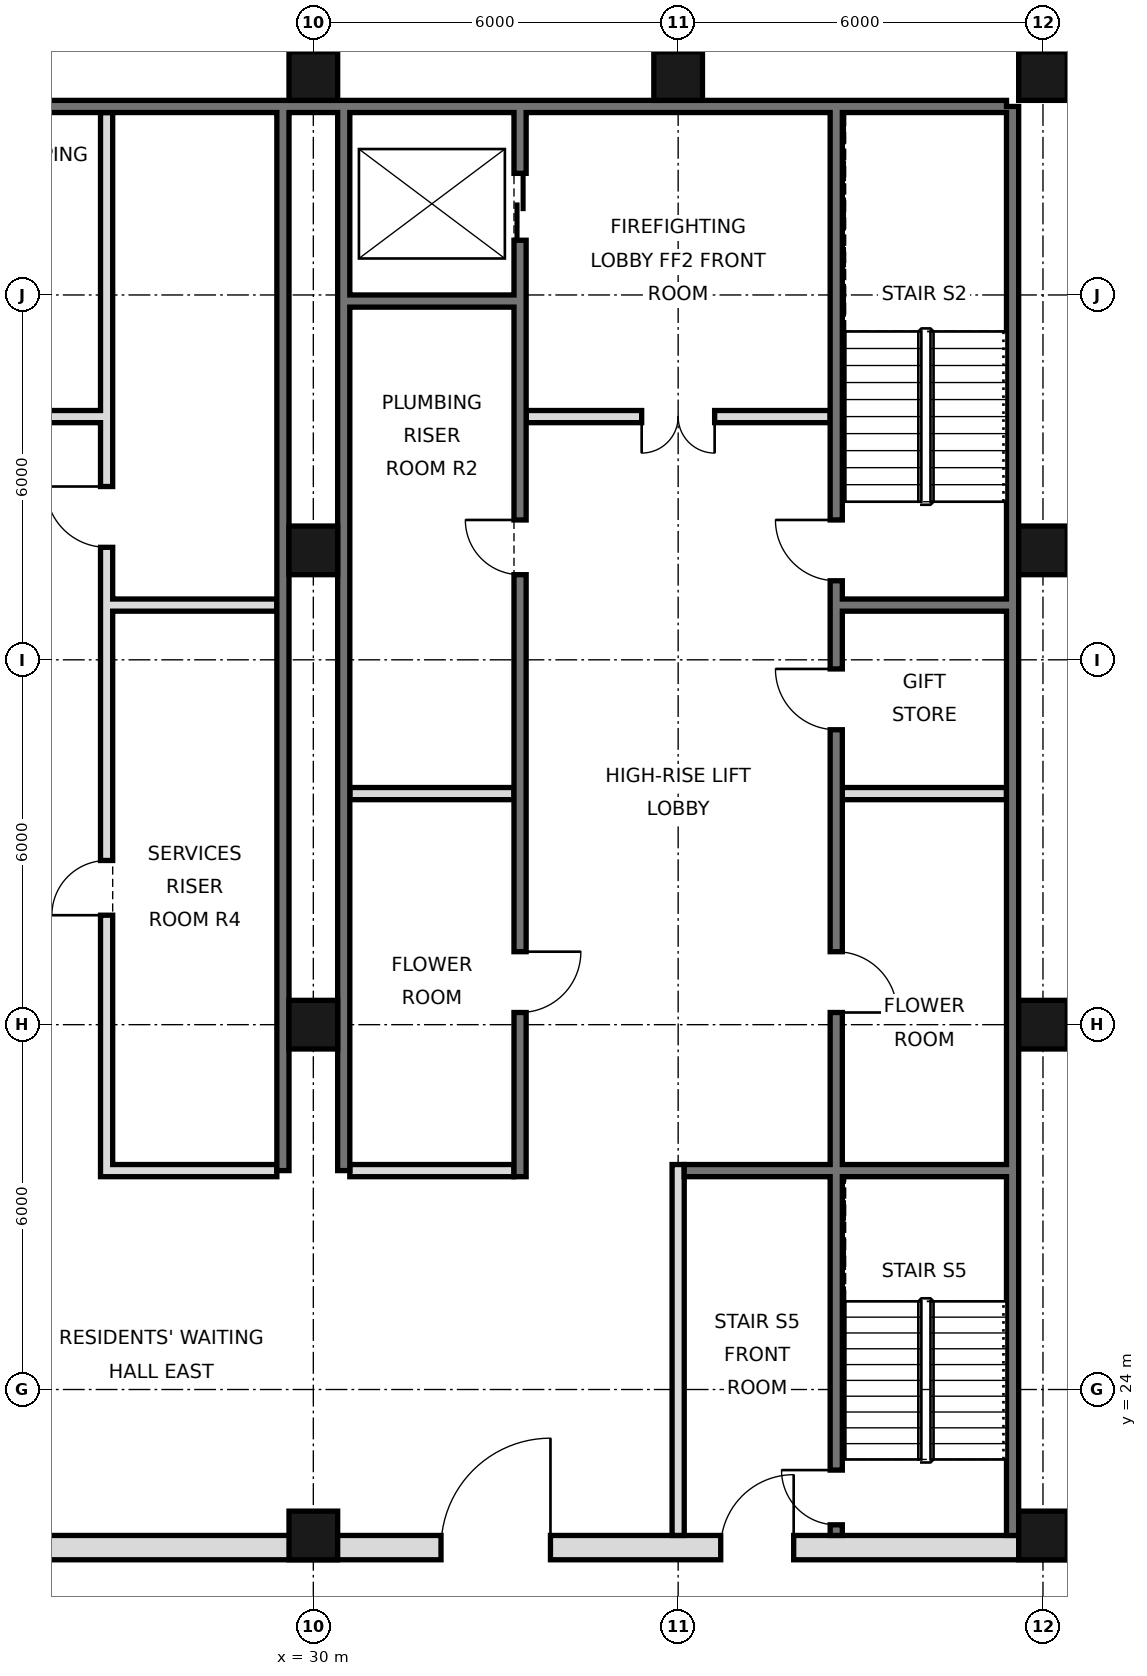
"""IFC4 building model, lengths in metres.
Left out: names, types, materials, properties, quantities, classifications, styles, units other than length and angle.
Written with IfcOpenShell. Run it as: python <this file> out.ifc"""

import sys

from ifc_helpers import new_model, si_unit, direction, frame, frame_2d, origin, origin_2d, place, context, subcontext, project, spatial, rectangle, hollow_rectangle, extrude, element, fill, save


model = new_model("IFC4")
c1 = context("Model", 3, precision=1e-05, world=origin(), true_north=direction((0.0, 1.0)))
c2 = subcontext(c1, "Body", "Model", "MODEL_VIEW")
j1 = project(units=[si_unit("LENGTHUNIT", "METRE"), si_unit("PLANEANGLEUNIT", "RADIAN")], contexts=[c1])
p1 = place(None, origin())
s1 = spatial("IfcSite", under=j1, at=p1, CompositionType="ELEMENT")
p2 = place(p1, origin())
s2 = spatial("IfcBuilding", under=s1, at=p2, CompositionType="ELEMENT")
p3 = place(p2, frame((0.0, 0.0, 71.4)))
s3 = spatial("IfcBuildingStorey", under=s2, at=p3, CompositionType="ELEMENT", Elevation=71.4)
for number, where, z_axis, x_axis in (
    (1, (30.0, 21.6, 0.0), (0.0, 0.0, 1.0), (1.0, 0.0, 0.0)),
    (2, (30.0, 30.0, 0.0), (0.0, 0.0, 1.0), (1.0, 0.0, 0.0)),
    (3, (30.0, 37.8, 0.0), (0.0, 0.0, 1.0), (1.0, 0.0, 0.0)),
    (4, (30.0, 45.6, 0.0), (0.0, 0.0, 1.0), (1.0, 0.0, 0.0)),
    (5, (36.0, 45.6, 0.0), (0.0, 0.0, 1.0), (1.0, 0.0, 0.0)),
    (6, (42.0, 21.6, 0.0), (0.0, 0.0, 1.0), (1.0, 0.0, 0.0)),
    (7, (42.0, 30.0, 0.0), (0.0, 0.0, 1.0), (1.0, 0.0, 0.0)),
    (8, (42.0, 37.8, 0.0), (0.0, 0.0, 1.0), (1.0, 0.0, 0.0)),
    (9, (42.0, 45.6, 0.0), (0.0, 0.0, 1.0), (1.0, 0.0, 0.0)),
):
    element("IfcColumn", number, at=place(p3, frame(where, z_axis=z_axis, x_axis=x_axis)), inside=s3, PredefinedType="COLUMN", context=c2, shape_type="SweptSolid", body=[
        extrude(hollow_rectangle(XDim=0.8, YDim=0.8, WallThickness=0.06, at=origin_2d()), origin(), (0.0, 0.0, 1.0), 3.6),
    ])
p4 = place(p3, frame((41.5, 21.6, 0.0), z_axis=(0.0, 0.0, 1.0), x_axis=(0.0, 1.0, 0.0)))
e10 = element("IfcWall", 10, at=p4, inside=s3, PredefinedType="SOLIDWALL", context=c2, shape_type="SweptSolid", body=[
    extrude(rectangle(XDim=23.5, YDim=0.2, at=frame_2d((11.75, 0.0))), origin(), (0.0, 0.0, 1.0), 3.42),
])
p5 = place(p3, frame((6.6, 45.1, 0.0), z_axis=(0.0, 0.0, 1.0), x_axis=(1.0, 0.0, 0.0)))
e11 = element("IfcWall", 11, at=p5, inside=s3, PredefinedType="SOLIDWALL", context=c2, shape_type="SweptSolid", body=[
    extrude(rectangle(XDim=34.8, YDim=0.2, at=frame_2d((17.4, 0.0))), origin(), (0.0, 0.0, 1.0), 3.42),
])
for number, where, z_axis, x_axis in (
    (12, (29.5, 27.6, 0.0), (0.0, 0.0, 1.0), (0.0, 1.0, 0.0)),
    (13, (30.5, 27.6, 0.0), (0.0, 0.0, 1.0), (0.0, 1.0, 0.0)),
):
    element("IfcWall", number, at=place(p3, frame(where, z_axis=z_axis, x_axis=x_axis)), inside=s3, PredefinedType="SOLIDWALL", context=c2, shape_type="SweptSolid", body=[
        extrude(rectangle(XDim=17.5, YDim=0.2, at=frame_2d((8.75, 0.0))), origin(), (0.0, 0.0, 1.0), 3.42),
    ])
p6 = place(p3, frame((5.6, 21.4, 0.0), z_axis=(0.0, 0.0, 1.0), x_axis=(1.0, 0.0, 0.0)))
e14 = element("IfcWall", 14, at=p6, inside=s3, PredefinedType="SOLIDWALL", context=c2, shape_type="SweptSolid", body=[
    extrude(rectangle(XDim=36.8, YDim=0.4, at=frame_2d((18.4, 0.0))), origin(), (0.0, 0.0, 1.0), 3.42),
])
p7 = place(p6, frame((8.5, 0.0, 0.0)))
e15 = element("IfcOpeningElement", 15, at=p7, cuts=e14, PredefinedType="OPENING", context=c2, shape_type="SweptSolid", body=[
    extrude(rectangle(XDim=1.8, YDim=2.1, at=frame_2d((0.9, 1.05))), frame((0.0, 0.21, 0.0), z_axis=(0.0, -1.0, 0.0), x_axis=(1.0, 0.0, 0.0)), (0.0, 0.0, 1.0), 0.42),
])
p8 = place(p6, frame((17.5, 0.0, 0.0)))
e16 = element("IfcOpeningElement", 16, at=p8, cuts=e14, PredefinedType="OPENING", context=c2, shape_type="SweptSolid", body=[
    extrude(rectangle(XDim=1.8, YDim=2.1, at=frame_2d((0.9, 1.05))), frame((0.0, 0.21, 0.0), z_axis=(0.0, -1.0, 0.0), x_axis=(1.0, 0.0, 0.0)), (0.0, 0.0, 1.0), 0.42),
])
p9 = place(p6, frame((26.5, 0.0, 0.0)))
e17 = element("IfcOpeningElement", 17, at=p9, cuts=e14, PredefinedType="OPENING", context=c2, shape_type="SweptSolid", body=[
    extrude(rectangle(XDim=1.8, YDim=2.1, at=frame_2d((0.9, 1.05))), frame((0.0, 0.21, 0.0), z_axis=(0.0, -1.0, 0.0), x_axis=(1.0, 0.0, 0.0)), (0.0, 0.0, 1.0), 0.42),
])
p10 = place(p6, frame((4.5, 0.0, 0.0)))
e18 = element("IfcOpeningElement", 18, at=p10, cuts=e14, PredefinedType="OPENING", context=c2, shape_type="SweptSolid", body=[
    extrude(rectangle(XDim=1.2, YDim=2.1, at=frame_2d((0.6, 1.05))), frame((0.0, 0.21, 0.0), z_axis=(0.0, -1.0, 0.0), x_axis=(1.0, 0.0, 0.0)), (0.0, 0.0, 1.0), 0.42),
])
p11 = place(p6, frame((31.1, 0.0, 0.0)))
e19 = element("IfcOpeningElement", 19, at=p11, cuts=e14, PredefinedType="OPENING", context=c2, shape_type="SweptSolid", body=[
    extrude(rectangle(XDim=1.2, YDim=2.1, at=frame_2d((0.6, 1.05))), frame((0.0, 0.21, 0.0), z_axis=(0.0, -1.0, 0.0), x_axis=(1.0, 0.0, 0.0)), (0.0, 0.0, 1.0), 0.42),
])
p12 = place(p3, frame((26.6, 27.5, 0.0), z_axis=(0.0, 0.0, 1.0), x_axis=(0.0, 1.0, 0.0)))
e20 = element("IfcWall", 20, at=p12, inside=s3, PredefinedType="SOLIDWALL", context=c2, shape_type="SweptSolid", body=[
    extrude(rectangle(XDim=17.5, YDim=0.2, at=frame_2d((8.75, 0.0))), origin(), (0.0, 0.0, 1.0), 3.42),
])
p13 = place(p12, frame((4.3, 0.0, 0.0)))
e21 = element("IfcOpeningElement", 21, at=p13, cuts=e20, PredefinedType="OPENING", context=c2, shape_type="SweptSolid", body=[
    extrude(rectangle(XDim=0.9, YDim=2.1, at=frame_2d((0.45, 1.05))), frame((0.0, 0.11, 0.0), z_axis=(0.0, -1.0, 0.0), x_axis=(1.0, 0.0, 0.0)), (0.0, 0.0, 1.0), 0.22),
])
p14 = place(p12, frame((10.35, 0.0, 0.0)))
e22 = element("IfcOpeningElement", 22, at=p14, cuts=e20, PredefinedType="OPENING", context=c2, shape_type="SweptSolid", body=[
    extrude(rectangle(XDim=1.0, YDim=2.1, at=frame_2d((0.5, 1.05))), frame((0.0, 0.11, 0.0), z_axis=(0.0, -1.0, 0.0), x_axis=(1.0, 0.0, 0.0)), (0.0, 0.0, 1.0), 0.22),
])
p15 = place(p3, frame((33.4, 27.5, 0.0), z_axis=(0.0, 0.0, 1.0), x_axis=(0.0, 1.0, 0.0)))
e23 = element("IfcWall", 23, at=p15, inside=s3, PredefinedType="SOLIDWALL", context=c2, shape_type="SweptSolid", body=[
    extrude(rectangle(XDim=17.5, YDim=0.2, at=frame_2d((8.75, 0.0))), origin(), (0.0, 0.0, 1.0), 3.42),
])
p16 = place(p15, frame((15.4, 0.0, 0.0)))
e24 = element("IfcOpeningElement", 24, at=p16, cuts=e23, PredefinedType="OPENING", context=c2, shape_type="SweptSolid", body=[
    extrude(rectangle(XDim=1.1, YDim=2.1, at=frame_2d((0.55, 1.05))), frame((0.0, 0.11, 0.0), z_axis=(0.0, -1.0, 0.0), x_axis=(1.0, 0.0, 0.0)), (0.0, 0.0, 1.0), 0.22),
])
p17 = place(p15, frame((2.7, 0.0, 0.0)))
e25 = element("IfcOpeningElement", 25, at=p17, cuts=e23, PredefinedType="OPENING", context=c2, shape_type="SweptSolid", body=[
    extrude(rectangle(XDim=1.0, YDim=2.1, at=frame_2d((0.5, 1.05))), frame((0.0, 0.11, 0.0), z_axis=(0.0, -1.0, 0.0), x_axis=(1.0, 0.0, 0.0)), (0.0, 0.0, 1.0), 0.22),
])
p18 = place(p15, frame((9.9, 0.0, 0.0)))
e26 = element("IfcOpeningElement", 26, at=p18, cuts=e23, PredefinedType="OPENING", context=c2, shape_type="SweptSolid", body=[
    extrude(rectangle(XDim=0.9, YDim=2.1, at=frame_2d((0.45, 1.05))), frame((0.0, 0.11, 0.0), z_axis=(0.0, -1.0, 0.0), x_axis=(1.0, 0.0, 0.0)), (0.0, 0.0, 1.0), 0.22),
])
p19 = place(p3, frame((36.0, 21.6, 0.0), z_axis=(0.0, 0.0, 1.0), x_axis=(0.0, 1.0, 0.0)))
e27 = element("IfcWall", 27, at=p19, inside=s3, PredefinedType="PARTITIONING", context=c2, shape_type="SweptSolid", body=[
    extrude(rectangle(XDim=6.1, YDim=0.2, at=frame_2d((3.05, 0.0))), origin(), (0.0, 0.0, 1.0), 3.42),
])
p20 = place(p3, frame((38.6, 21.6, 0.0), z_axis=(0.0, 0.0, 1.0), x_axis=(0.0, 1.0, 0.0)))
e28 = element("IfcWall", 28, at=p20, inside=s3, PredefinedType="SOLIDWALL", context=c2, shape_type="SweptSolid", body=[
    extrude(rectangle(XDim=23.4, YDim=0.2, at=frame_2d((11.7, 0.0))), origin(), (0.0, 0.0, 1.0), 3.42),
])
p21 = place(p20, frame((8.6, 0.0, 0.0)))
e29 = element("IfcOpeningElement", 29, at=p21, cuts=e28, PredefinedType="OPENING", context=c2, shape_type="SweptSolid", body=[
    extrude(rectangle(XDim=1.0, YDim=2.1, at=frame_2d((0.5, 1.05))), frame((0.0, 0.11, 0.0), z_axis=(0.0, -1.0, 0.0), x_axis=(1.0, 0.0, 0.0)), (0.0, 0.0, 1.0), 0.22),
])
p22 = place(p20, frame((13.25, 0.0, 0.0)))
e30 = element("IfcOpeningElement", 30, at=p22, cuts=e28, PredefinedType="OPENING", context=c2, shape_type="SweptSolid", body=[
    extrude(rectangle(XDim=1.0, YDim=2.1, at=frame_2d((0.5, 1.05))), frame((0.0, 0.11, 0.0), z_axis=(0.0, -1.0, 0.0), x_axis=(1.0, 0.0, 0.0)), (0.0, 0.0, 1.0), 0.22),
])
p23 = place(p20, frame((15.7, 0.0, 0.0)))
e31 = element("IfcOpeningElement", 31, at=p23, cuts=e28, PredefinedType="OPENING", context=c2, shape_type="SweptSolid", body=[
    extrude(rectangle(XDim=1.0, YDim=2.1, at=frame_2d((0.5, 1.05))), frame((0.0, 0.11, 0.0), z_axis=(0.0, -1.0, 0.0), x_axis=(1.0, 0.0, 0.0)), (0.0, 0.0, 1.0), 0.22),
])
p24 = place(p20, frame((0.175, 0.0, 0.0)))
e32 = element("IfcOpeningElement", 32, at=p24, cuts=e28, PredefinedType="OPENING", context=c2, shape_type="SweptSolid", body=[
    extrude(rectangle(XDim=0.9, YDim=2.1, at=frame_2d((0.45, 1.05))), frame((0.0, 0.11, 0.0), z_axis=(0.0, -1.0, 0.0), x_axis=(1.0, 0.0, 0.0)), (0.0, 0.0, 1.0), 0.22),
])
p25 = place(p3, frame((26.7, 27.6, 0.0), z_axis=(0.0, 0.0, 1.0), x_axis=(1.0, 0.0, 0.0)))
e33 = element("IfcWall", 33, at=p25, inside=s3, PredefinedType="SOLIDWALL", context=c2, shape_type="SweptSolid", body=[
    extrude(rectangle(XDim=2.7, YDim=0.2, at=frame_2d((1.35, 0.0))), origin(), (0.0, 0.0, 1.0), 3.42),
])
p26 = place(p3, frame((30.6, 27.6, 0.0), z_axis=(0.0, 0.0, 1.0), x_axis=(1.0, 0.0, 0.0)))
e34 = element("IfcWall", 34, at=p26, inside=s3, PredefinedType="PARTITIONING", context=c2, shape_type="SweptSolid", body=[
    extrude(rectangle(XDim=2.7, YDim=0.2, at=frame_2d((1.35, 0.0))), origin(), (0.0, 0.0, 1.0), 3.42),
])
p27 = place(p3, frame((36.1, 27.6, 0.0), z_axis=(0.0, 0.0, 1.0), x_axis=(1.0, 0.0, 0.0)))
e35 = element("IfcWall", 35, at=p27, inside=s3, PredefinedType="SOLIDWALL", context=c2, shape_type="SweptSolid", body=[
    extrude(rectangle(XDim=5.3, YDim=0.2, at=frame_2d((2.65, 0.0))), origin(), (0.0, 0.0, 1.0), 3.42),
])
p28 = place(p3, frame((30.6, 33.8, 0.0), z_axis=(0.0, 0.0, 1.0), x_axis=(1.0, 0.0, 0.0)))
e36 = element("IfcWall", 36, at=p28, inside=s3, PredefinedType="SOLIDWALL", context=c2, shape_type="SweptSolid", body=[
    extrude(rectangle(XDim=2.7, YDim=0.2, at=frame_2d((1.35, 0.0))), origin(), (0.0, 0.0, 1.0), 3.42),
])
p29 = place(p3, frame((38.7, 33.8, 0.0), z_axis=(0.0, 0.0, 1.0), x_axis=(1.0, 0.0, 0.0)))
e37 = element("IfcWall", 37, at=p29, inside=s3, PredefinedType="PARTITIONING", context=c2, shape_type="SweptSolid", body=[
    extrude(rectangle(XDim=2.7, YDim=0.2, at=frame_2d((1.35, 0.0))), origin(), (0.0, 0.0, 1.0), 3.42),
])
for number, where, z_axis, x_axis in (
    (38, (26.7, 36.9, 0.0), (0.0, 0.0, 1.0), (1.0, 0.0, 0.0)),
    (39, (38.7, 36.9, 0.0), (0.0, 0.0, 1.0), (1.0, 0.0, 0.0)),
):
    element("IfcWall", number, at=place(p3, frame(where, z_axis=z_axis, x_axis=x_axis)), inside=s3, PredefinedType="SOLIDWALL", context=c2, shape_type="SweptSolid", body=[
        extrude(rectangle(XDim=2.7, YDim=0.2, at=frame_2d((1.35, 0.0))), origin(), (0.0, 0.0, 1.0), 3.42),
    ])
p30 = place(p3, frame((21.5, 40.0, 0.0), z_axis=(0.0, 0.0, 1.0), x_axis=(1.0, 0.0, 0.0)))
e40 = element("IfcWall", 40, at=p30, inside=s3, PredefinedType="PARTITIONING", context=c2, shape_type="SweptSolid", body=[
    extrude(rectangle(XDim=5.0, YDim=0.2, at=frame_2d((2.5, 0.0))), origin(), (0.0, 0.0, 1.0), 3.42),
])
p31 = place(p30, frame((1.9, 0.0, 0.0)))
e41 = element("IfcOpeningElement", 41, at=p31, cuts=e40, PredefinedType="OPENING", context=c2, shape_type="SweptSolid", body=[
    extrude(rectangle(XDim=1.2, YDim=2.1, at=frame_2d((0.6, 1.05))), frame((0.0, 0.11, 0.0), z_axis=(0.0, -1.0, 0.0), x_axis=(1.0, 0.0, 0.0)), (0.0, 0.0, 1.0), 0.22),
])
p32 = place(p3, frame((33.5, 40.0, 0.0), z_axis=(0.0, 0.0, 1.0), x_axis=(1.0, 0.0, 0.0)))
e42 = element("IfcWall", 42, at=p32, inside=s3, PredefinedType="PARTITIONING", context=c2, shape_type="SweptSolid", body=[
    extrude(rectangle(XDim=5.0, YDim=0.2, at=frame_2d((2.5, 0.0))), origin(), (0.0, 0.0, 1.0), 3.42),
])
p33 = place(p32, frame((1.9, 0.0, 0.0)))
e43 = element("IfcOpeningElement", 43, at=p33, cuts=e42, PredefinedType="OPENING", context=c2, shape_type="SweptSolid", body=[
    extrude(rectangle(XDim=1.2, YDim=2.1, at=frame_2d((0.6, 1.05))), frame((0.0, 0.11, 0.0), z_axis=(0.0, -1.0, 0.0), x_axis=(1.0, 0.0, 0.0)), (0.0, 0.0, 1.0), 0.22),
])
p34 = place(p3, frame((30.6, 41.9, 0.0), z_axis=(0.0, 0.0, 1.0), x_axis=(1.0, 0.0, 0.0)))
e44 = element("IfcWall", 44, at=p34, inside=s3, PredefinedType="SOLIDWALL", context=c2, shape_type="SweptSolid", body=[
    extrude(rectangle(XDim=2.7, YDim=0.2, at=frame_2d((1.35, 0.0))), origin(), (0.0, 0.0, 1.0), 3.42),
])
p35 = place(p9, frame((1.8, 0.0, 0.0), z_axis=(0.0, 0.0, 1.0), x_axis=(-1.0, 0.0, 0.0)))
e45 = element("IfcDoor", 45, at=p35, inside=s3, OperationType="SINGLE_SWING_LEFT", PredefinedType="DOOR", context=c2, shape_type="SweptSolid", body=[
    extrude(rectangle(XDim=1.8, YDim=2.1, at=frame_2d((0.9, 1.05))), frame((0.0, 0.025, 0.0), z_axis=(0.0, -1.0, 0.0), x_axis=(1.0, 0.0, 0.0)), (0.0, 0.0, 1.0), 0.05),
])
fill(e17, e45)
p36 = place(p11, frame((1.2, 0.0, 0.0), z_axis=(0.0, 0.0, 1.0), x_axis=(-1.0, 0.0, 0.0)))
e46 = element("IfcDoor", 46, at=p36, inside=s3, OperationType="SINGLE_SWING_LEFT", PredefinedType="DOOR", context=c2, shape_type="SweptSolid", body=[
    extrude(rectangle(XDim=1.2, YDim=2.1, at=frame_2d((0.6, 1.05))), frame((0.0, 0.025, 0.0), z_axis=(0.0, -1.0, 0.0), x_axis=(1.0, 0.0, 0.0)), (0.0, 0.0, 1.0), 0.05),
])
fill(e19, e46)
p37 = place(p33, frame((1.2, 0.0, 0.0), z_axis=(0.0, 0.0, 1.0), x_axis=(-1.0, 0.0, 0.0)))
e47 = element("IfcDoor", 47, at=p37, inside=s3, OperationType="DOUBLE_DOOR_SINGLE_SWING", PredefinedType="DOOR", context=c2, shape_type="SweptSolid", body=[
    extrude(rectangle(XDim=1.2, YDim=2.1, at=frame_2d((0.6, 1.05))), frame((0.0, 0.025, 0.0), z_axis=(0.0, -1.0, 0.0), x_axis=(1.0, 0.0, 0.0)), (0.0, 0.0, 1.0), 0.05),
])
fill(e43, e47)
p38 = place(p16, origin())
e48 = element("IfcDoor", 48, at=p38, inside=s3, OperationType="DOUBLE_DOOR_SLIDING", PredefinedType="DOOR", context=c2, shape_type="SweptSolid", body=[
    extrude(rectangle(XDim=1.1, YDim=2.1, at=frame_2d((0.55, 1.05))), frame((0.0, 0.025, 0.0), z_axis=(0.0, -1.0, 0.0), x_axis=(1.0, 0.0, 0.0)), (0.0, 0.0, 1.0), 0.05),
])
fill(e24, e48)
p39 = place(p21, frame((1.0, 0.0, 0.0), z_axis=(0.0, 0.0, 1.0), x_axis=(-1.0, 0.0, 0.0)))
e49 = element("IfcDoor", 49, at=p39, inside=s3, OperationType="SINGLE_SWING_RIGHT", PredefinedType="DOOR", context=c2, shape_type="SweptSolid", body=[
    extrude(rectangle(XDim=1.0, YDim=2.1, at=frame_2d((0.5, 1.05))), frame((0.0, 0.025, 0.0), z_axis=(0.0, -1.0, 0.0), x_axis=(1.0, 0.0, 0.0)), (0.0, 0.0, 1.0), 0.05),
])
fill(e29, e49)
p40 = place(p22, frame((1.0, 0.0, 0.0), z_axis=(0.0, 0.0, 1.0), x_axis=(-1.0, 0.0, 0.0)))
e50 = element("IfcDoor", 50, at=p40, inside=s3, OperationType="SINGLE_SWING_LEFT", PredefinedType="DOOR", context=c2, shape_type="SweptSolid", body=[
    extrude(rectangle(XDim=1.0, YDim=2.1, at=frame_2d((0.5, 1.05))), frame((0.0, 0.025, 0.0), z_axis=(0.0, -1.0, 0.0), x_axis=(1.0, 0.0, 0.0)), (0.0, 0.0, 1.0), 0.05),
])
fill(e30, e50)
p41 = place(p17, origin())
e51 = element("IfcDoor", 51, at=p41, inside=s3, OperationType="SINGLE_SWING_RIGHT", PredefinedType="DOOR", context=c2, shape_type="SweptSolid", body=[
    extrude(rectangle(XDim=1.0, YDim=2.1, at=frame_2d((0.5, 1.05))), frame((0.0, 0.025, 0.0), z_axis=(0.0, -1.0, 0.0), x_axis=(1.0, 0.0, 0.0)), (0.0, 0.0, 1.0), 0.05),
])
fill(e25, e51)
p42 = place(p23, frame((1.0, 0.0, 0.0), z_axis=(0.0, 0.0, 1.0), x_axis=(-1.0, 0.0, 0.0)))
e52 = element("IfcDoor", 52, at=p42, inside=s3, OperationType="SINGLE_SWING_LEFT", PredefinedType="DOOR", context=c2, shape_type="SweptSolid", body=[
    extrude(rectangle(XDim=1.0, YDim=2.1, at=frame_2d((0.5, 1.05))), frame((0.0, 0.025, 0.0), z_axis=(0.0, -1.0, 0.0), x_axis=(1.0, 0.0, 0.0)), (0.0, 0.0, 1.0), 0.05),
])
fill(e31, e52)
p43 = place(p24, frame((0.9, 0.0, 0.0), z_axis=(0.0, 0.0, 1.0), x_axis=(-1.0, 0.0, 0.0)))
e53 = element("IfcDoor", 53, at=p43, inside=s3, OperationType="SINGLE_SWING_LEFT", PredefinedType="DOOR", context=c2, shape_type="SweptSolid", body=[
    extrude(rectangle(XDim=0.9, YDim=2.1, at=frame_2d((0.45, 1.05))), frame((0.0, 0.025, 0.0), z_axis=(0.0, -1.0, 0.0), x_axis=(1.0, 0.0, 0.0)), (0.0, 0.0, 1.0), 0.05),
])
fill(e32, e53)
p44 = place(p18, frame((0.9, 0.0, 0.0), z_axis=(0.0, 0.0, 1.0), x_axis=(-1.0, 0.0, 0.0)))
e54 = element("IfcDoor", 54, at=p44, inside=s3, OperationType="SINGLE_SWING_LEFT", PredefinedType="DOOR", context=c2, shape_type="SweptSolid", body=[
    extrude(rectangle(XDim=0.9, YDim=2.1, at=frame_2d((0.45, 1.05))), frame((0.0, 0.025, 0.0), z_axis=(0.0, -1.0, 0.0), x_axis=(1.0, 0.0, 0.0)), (0.0, 0.0, 1.0), 0.05),
])
fill(e26, e54)
p45 = place(p13, origin())
e55 = element("IfcDoor", 55, at=p45, inside=s3, OperationType="SINGLE_SWING_LEFT", PredefinedType="DOOR", context=c2, shape_type="SweptSolid", body=[
    extrude(rectangle(XDim=0.9, YDim=2.1, at=frame_2d((0.45, 1.05))), frame((0.0, 0.025, 0.0), z_axis=(0.0, -1.0, 0.0), x_axis=(1.0, 0.0, 0.0)), (0.0, 0.0, 1.0), 0.05),
])
fill(e21, e55)
p46 = place(p14, frame((1.0, 0.0, 0.0), z_axis=(0.0, 0.0, 1.0), x_axis=(-1.0, 0.0, 0.0)))
e56 = element("IfcDoor", 56, at=p46, inside=s3, OperationType="SINGLE_SWING_LEFT", PredefinedType="DOOR", context=c2, shape_type="SweptSolid", body=[
    extrude(rectangle(XDim=1.0, YDim=2.1, at=frame_2d((0.5, 1.05))), frame((0.0, 0.025, 0.0), z_axis=(0.0, -1.0, 0.0), x_axis=(1.0, 0.0, 0.0)), (0.0, 0.0, 1.0), 0.05),
])
fill(e22, e56)
save(model, sys.argv[1])
